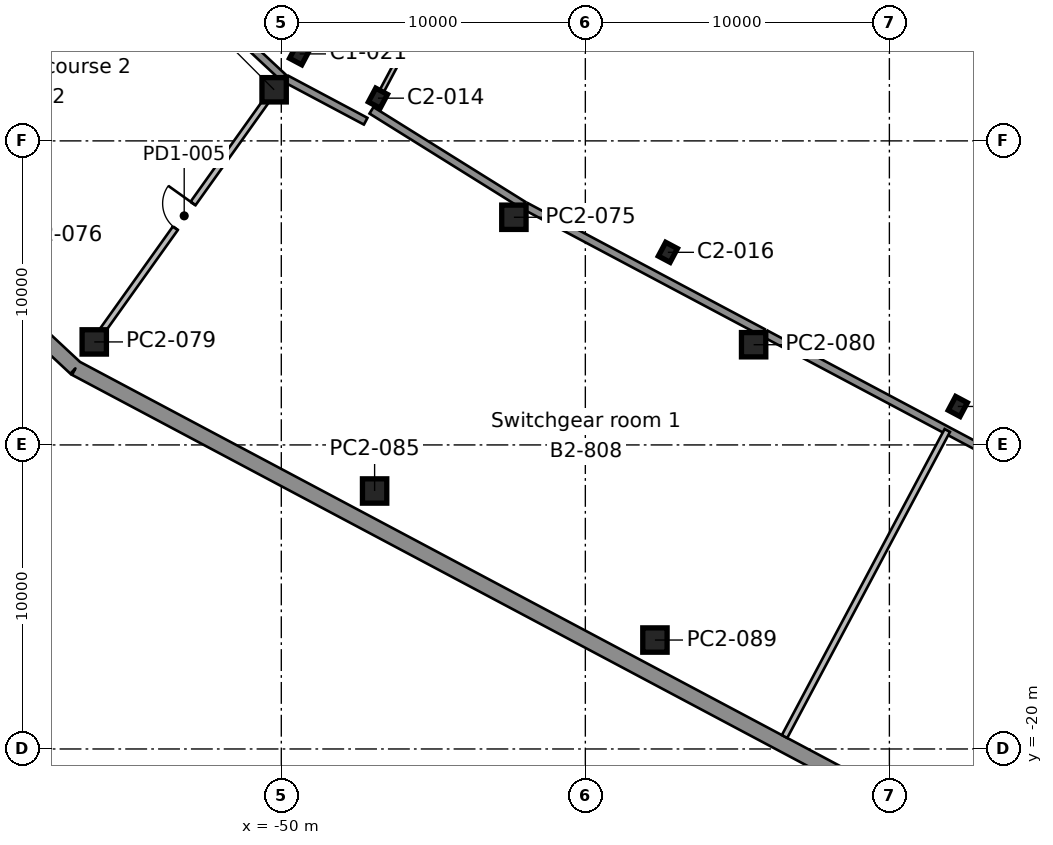
"""IFC4 building model, lengths in metres.
Left out: names, types, materials, properties, quantities, classifications, styles, units other than length and angle.
Written with IfcOpenShell. Run it as: python <this file> out.ifc"""

import sys

from ifc_helpers import new_model, si_unit, direction, frame, frame_2d, origin, origin_2d, place, context, subcontext, project, spatial, rectangle, i_section, extrude, element, fill, save


model = new_model("IFC4")
c1 = context("Model", 3, precision=1e-05, world=origin(), true_north=direction((0.0, 1.0)))
c2 = subcontext(c1, "Body", "Model", "MODEL_VIEW")
j1 = project(units=[si_unit("LENGTHUNIT", "METRE"), si_unit("PLANEANGLEUNIT", "RADIAN")], contexts=[c1])
p1 = place(None, origin())
s1 = spatial("IfcSite", under=j1, at=p1, CompositionType="ELEMENT")
p2 = place(p1, origin())
s2 = spatial("IfcBuilding", under=s1, at=p2, CompositionType="ELEMENT")
p3 = place(p2, frame((0.0, 0.0, -9.0)))
s3 = spatial("IfcBuildingStorey", under=s2, at=p3, CompositionType="ELEMENT", Elevation=-9.0)
for number, where, z_axis, x_axis in (
    (1, (-27.749, -8.735, 0.0), (0.0, 0.0, 1.0), (0.883, -0.469, 0.0)),
    (2, (-37.285, -3.665, 0.0), (0.0, 0.0, 1.0), (0.883, -0.469, 0.0)),
    (3, (-46.821, 1.405, 0.0), (0.0, 0.0, 1.0), (0.883, -0.469, 0.0)),
):
    element("IfcColumn", number, at=place(p3, frame(where, z_axis=z_axis, x_axis=x_axis)), inside=s3, PredefinedType="COLUMN", context=c2, shape_type="SweptSolid", body=[
        extrude(i_section(OverallWidth=0.437, OverallDepth=0.513, WebThickness=0.061, FlangeThickness=0.097, FilletRadius=0.015, at=origin_2d()), origin(), (0.0, 0.0, 1.0), 4.5),
    ])
p4 = place(p3, frame((-49.394, 2.861, 0.0), z_axis=(0.0, 0.0, 1.0), x_axis=(0.882947592859, -0.469471562786, 0.0)))
e4 = element("IfcColumn", 4, at=p4, inside=s3, PredefinedType="COLUMN", context=c2, shape_type="SweptSolid", body=[
    extrude(i_section(OverallWidth=0.455, OverallDepth=0.569, WebThickness=0.078, FlangeThickness=0.125, FilletRadius=0.015, at=origin_2d()), origin(), (0.0, 0.0, 1.0), 4.5),
])
p5 = place(p3, frame((-22.937, 1.38, 0.0), z_axis=(0.0, 0.0, 1.0), x_axis=(-0.88295276571, 0.46946183394, 0.0)))
e5 = element("IfcWall", 5, at=p5, inside=s3, PredefinedType="SHEAR", context=c2, shape_type="SweptSolid", body=[
    extrude(rectangle(XDim=20.2, YDim=0.9, at=frame_2d((10.1, 0.0))), origin(), (0.0, 0.0, 1.0), 4.5),
])
p6 = place(p3, frame((-68.297, 3.277, 0.0), z_axis=(0.0, 0.0, 1.0), x_axis=(0.73135285176, -0.681999271424, 0.0)))
e6 = element("IfcWall", 6, at=p6, inside=s3, PredefinedType="SOLIDWALL", context=c2, shape_type="SweptSolid", body=[
    extrude(rectangle(XDim=15.765, YDim=0.5, at=frame_2d((7.883, 0.0))), origin(), (0.0, 0.0, 1.0), 4.5),
])
p7 = place(p3, frame((-56.767, -7.475, 0.0), z_axis=(0.0, 0.0, 1.0), x_axis=(0.882947974138, -0.469470845703, 0.0)))
e7 = element("IfcWall", 7, at=p7, inside=s3, PredefinedType="SOLIDWALL", context=c2, shape_type="SweptSolid", body=[
    extrude(rectangle(XDim=57.833, YDim=0.5, at=frame_2d((28.917, 0.0))), origin(), (0.0, 0.0, 1.0), 4.5),
])
for number, where, z_axis, x_axis in (
    (8, (-37.711, -16.417, 0.0), (0.0, 0.0, 1.0), (1.0, 0.0, 0.0)),
    (9, (-46.931, -11.515, 0.0), (0.0, 0.0, 1.0), (1.0, 0.0, 0.0)),
    (10, (-34.465, -6.704, 0.0), (0.0, 0.0, 1.0), (1.0, 0.0, 0.0)),
    (11, (-56.152, -6.612, 0.0), (0.0, 0.0, 1.0), (1.0, 0.0, 0.0)),
    (12, (-42.35, -2.512, 0.0), (0.0, 0.0, 1.0), (1.0, 0.0, 0.0)),
    (13, (-50.236, 1.681, 0.0), (0.0, 0.0, 1.0), (1.0, 0.0, 0.0)),
):
    element("IfcColumn", number, at=place(p3, frame(where, z_axis=z_axis, x_axis=x_axis)), inside=s3, PredefinedType="COLUMN", context=c2, shape_type="SweptSolid", body=[
        extrude(rectangle(XDim=0.8, YDim=0.8, at=origin_2d()), origin(), (0.0, 0.0, 1.0), 4.1),
    ])
p8 = place(p3, frame((-33.448, -19.59, 0.0), z_axis=(0.0, 0.0, 1.0), x_axis=(0.469466279335, 0.882950402099, 0.0)))
e14 = element("IfcWall", 14, at=p8, inside=s3, PredefinedType="PARTITIONING", context=c2, shape_type="SweptSolid", body=[
    extrude(rectangle(XDim=11.4, YDim=0.2, at=frame_2d((5.7, 0.0))), origin(), (0.0, 0.0, 1.0), 4.1),
])
p9 = place(p3, frame((-47.224, 0.646, 0.0), z_axis=(0.0, 0.0, 1.0), x_axis=(-0.882766080441, 0.469812778905, 0.0)))
e15 = element("IfcWall", 15, at=p9, inside=s3, PredefinedType="SOLIDWALL", context=c2, shape_type="SweptSolid", body=[
    extrude(rectangle(XDim=2.958, YDim=0.25, at=frame_2d((1.479, 0.0))), origin(), (0.0, 0.0, 1.0), 4.1),
])
p10 = place(p3, frame((-28.092, -9.527, 0.0), z_axis=(0.0, 0.0, 1.0), x_axis=(-0.882951650701, 0.469463931016, 0.0)))
e16 = element("IfcWall", 16, at=p10, inside=s3, PredefinedType="SOLIDWALL", context=c2, shape_type="SweptSolid", body=[
    extrude(rectangle(XDim=6.765, YDim=0.25, at=frame_2d((3.382, 0.0))), origin(), (0.0, 0.0, 1.0), 4.1),
])
p11 = place(p3, frame((-34.153, -6.304, 0.0), z_axis=(0.0, 0.0, 1.0), x_axis=(-0.882943838539, 0.469478623567, 0.0)))
e17 = element("IfcWall", 17, at=p11, inside=s3, PredefinedType="SOLIDWALL", context=c2, shape_type="SweptSolid", body=[
    extrude(rectangle(XDim=8.831, YDim=0.25, at=frame_2d((4.415, 0.0))), origin(), (0.0, 0.0, 1.0), 4.1),
])
p12 = place(p3, frame((-42.037, -2.112, 0.0), z_axis=(0.0, 0.0, 1.0), x_axis=(-0.848449825707, 0.529275819642, 0.0)))
e18 = element("IfcWall", 18, at=p12, inside=s3, PredefinedType="SOLIDWALL", context=c2, shape_type="SweptSolid", body=[
    extrude(rectangle(XDim=5.889, YDim=0.25, at=frame_2d((2.945, 0.0))), origin(), (0.0, 0.0, 1.0), 4.1),
])
p13 = place(p3, frame((-50.521, 1.281, 0.0), z_axis=(0.0, 0.0, 1.0), x_axis=(-0.580708624763, -0.814111474631, 0.0)))
e19 = element("IfcWall", 19, at=p13, inside=s3, PredefinedType="PARTITIONING", context=c2, shape_type="SweptSolid", body=[
    extrude(rectangle(XDim=9.204, YDim=0.2, at=frame_2d((4.602, 0.0))), origin(), (0.0, 0.0, 1.0), 4.1),
])
p14 = place(p13, frame((4.102, 0.0, 0.0)))
e20 = element("IfcOpeningElement", 20, at=p14, cuts=e19, PredefinedType="OPENING", context=c2, shape_type="SweptSolid", body=[
    extrude(rectangle(XDim=1.0, YDim=2.1, at=frame_2d((0.5, 1.05))), frame((0.0, 0.11, 0.0), z_axis=(0.0, -1.0, 0.0), x_axis=(1.0, 0.0, 0.0)), (0.0, 0.0, 1.0), 0.22),
])
p15 = place(p3, frame((-26.267, -10.497, 0.0), z_axis=(0.0, 0.0, 1.0), x_axis=(-0.882964142915, 0.469440435335, 0.0)))
e21 = element("IfcWall", 21, at=p15, inside=s3, PredefinedType="SOLIDWALL", context=c2, shape_type="SweptSolid", body=[
    extrude(rectangle(XDim=2.065, YDim=0.25, at=frame_2d((1.033, 0.0))), origin(), (0.0, 0.0, 1.0), 4.1),
])
p16 = place(p3, frame((-46.7, 1.632, 0.0), z_axis=(0.0, 0.0, 1.0), x_axis=(0.46948131983, 0.882942404878, 0.0)))
e22 = element("IfcWall", 22, at=p16, inside=s3, PredefinedType="PARTITIONING", context=c2, shape_type="SweptSolid", body=[
    extrude(rectangle(XDim=9.688, YDim=0.15, at=frame_2d((4.844, 0.0))), origin(), (0.0, 0.0, 1.0), 4.1),
])
p17 = place(p3, frame((-53.972, 5.849, 0.0), z_axis=(0.0, 0.0, 1.0), x_axis=(0.731317536597, -0.682037140239, 0.0)))
e23 = element("IfcWall", 23, at=p17, inside=s3, PredefinedType="SOLIDWALL", context=c2, shape_type="SweptSolid", body=[
    extrude(rectangle(XDim=5.509, YDim=0.25, at=frame_2d((2.754, 0.0))), origin(), (0.0, 0.0, 1.0), 4.1),
])
p18 = place(p14, frame((1.0, 0.0, 0.0), z_axis=(0.0, 0.0, 1.0), x_axis=(-1.0, 0.0, 0.0)))
e24 = element("IfcDoor", 24, at=p18, inside=s3, OperationType="SINGLE_SWING_RIGHT", PredefinedType="DOOR", context=c2, shape_type="SweptSolid", body=[
    extrude(rectangle(XDim=1.0, YDim=2.1, at=frame_2d((0.5, 1.05))), frame((0.0, 0.025, 0.0), z_axis=(0.0, -1.0, 0.0), x_axis=(1.0, 0.0, 0.0)), (0.0, 0.0, 1.0), 0.05),
])
fill(e20, e24)
save(model, sys.argv[1])
